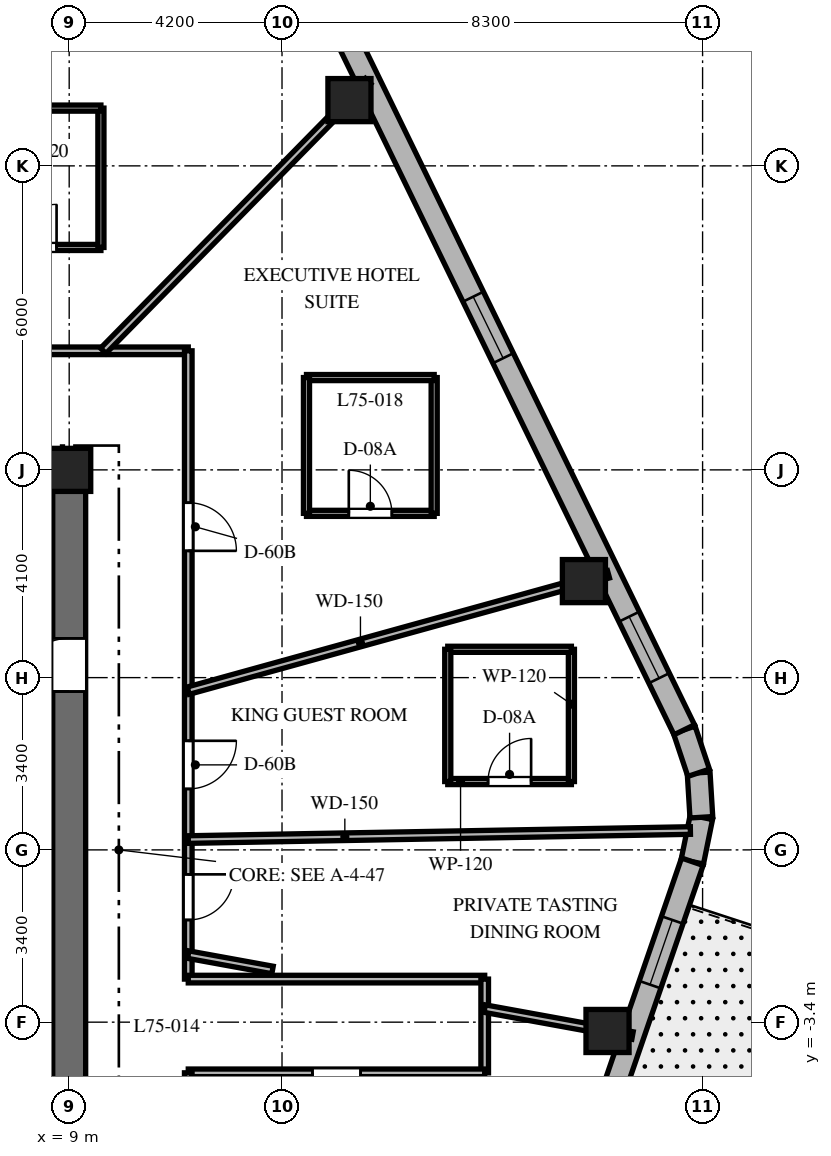
"""IFC4 building model, lengths in metres.
Left out: names, types, materials, properties, quantities, classifications, styles, units other than length and angle.
Written with IfcOpenShell. Run it as: python <this file> out.ifc"""

import sys

from ifc_helpers import new_model, si_unit, direction, frame, frame_2d, origin, origin_2d, place, context, subcontext, project, spatial, rectangle, extrude, element, fill, save


model = new_model("IFC4")
c1 = context("Model", 3, precision=1e-05, world=origin(), true_north=direction((0.0, 1.0)))
c2 = subcontext(c1, "Body", "Model", "MODEL_VIEW")
j1 = project(units=[si_unit("LENGTHUNIT", "METRE"), si_unit("PLANEANGLEUNIT", "RADIAN")], contexts=[c1])
p1 = place(None, origin())
s1 = spatial("IfcSite", under=j1, at=p1, CompositionType="ELEMENT")
p2 = place(p1, origin())
s2 = spatial("IfcBuilding", under=s1, at=p2, CompositionType="ELEMENT")
p3 = place(p2, frame((0.0, 0.0, 301.5)))
s3 = spatial("IfcBuildingStorey", under=s2, at=p3, CompositionType="ELEMENT", Elevation=301.5)
p4 = place(p3, frame((1.85, 7.5, 0.0), z_axis=(0.0, 0.0, 1.0), x_axis=(1.0, 0.0, 0.0)))
e1 = element("IfcWall", 1, at=p4, inside=s3, PredefinedType="SHEAR", context=c2, shape_type="SweptSolid", body=[
    extrude(rectangle(XDim=7.475, YDim=0.65, at=frame_2d((3.737, 0.0))), origin(), (0.0, 0.0, 1.0), 3.9),
])
p5 = place(p3, frame((9.0, -7.175, 0.0), z_axis=(0.0, 0.0, 1.0), x_axis=(0.0, 1.0, 0.0)))
e2 = element("IfcWall", 2, at=p5, inside=s3, PredefinedType="SHEAR", context=c2, shape_type="SweptSolid", body=[
    extrude(rectangle(XDim=14.35, YDim=0.65, at=frame_2d((7.175, 0.0))), origin(), (0.0, 0.0, 1.0), 3.9),
])
p6 = place(p5, frame((10.3, 0.0, 0.0)))
e3 = element("IfcOpeningElement", 3, at=p6, cuts=e2, PredefinedType="OPENING", context=c2, shape_type="SweptSolid", body=[
    extrude(rectangle(XDim=1.05, YDim=2.15, at=frame_2d((0.525, 1.075))), frame((0.0, 0.335, 0.0), z_axis=(0.0, -1.0, 0.0), x_axis=(1.0, 0.0, 0.0)), (0.0, 0.0, 1.0), 0.67),
])
for number, where, z_axis, x_axis in (
    (4, (9.0, 7.5, 0.0), (0.0, 0.0, 1.0), (1.0, 0.0, 0.0)),
    (5, (19.624, -3.574, 0.0), (0.0, 0.0, 1.0), (1.0, 0.0, 0.0)),
    (6, (19.158, 5.305, 0.0), (0.0, 0.0, 1.0), (1.0, 0.0, 0.0)),
    (7, (14.531, 14.798, 0.0), (0.0, 0.0, 1.0), (1.0, 0.0, 0.0)),
):
    element("IfcColumn", number, at=place(p3, frame(where, z_axis=z_axis, x_axis=x_axis)), inside=s3, PredefinedType="COLUMN", context=c2, shape_type="SweptSolid", body=[
        extrude(rectangle(XDim=0.85, YDim=0.85, at=origin_2d()), origin(), (0.0, 0.0, 1.0), 3.9),
    ])
p7 = place(p3, frame((21.298, -0.233, 0.0), z_axis=(0.0, 0.0, 1.0), x_axis=(0.199158176661, 0.979967356941, 0.0)))
e8 = element("IfcWall", 8, at=p7, inside=s3, PredefinedType="SOLIDWALL", context=c2, shape_type="SweptSolid", body=[
    extrude(rectangle(XDim=0.895, YDim=0.45, at=frame_2d((0.447, 0.0))), origin(), (0.0, 0.0, 1.0), 3.58),
])
p8 = place(p3, frame((21.476, 0.644, 0.0), z_axis=(0.0, 0.0, 1.0), x_axis=(-0.061031097918, 0.998135865044, 0.0)))
e9 = element("IfcWall", 9, at=p8, inside=s3, PredefinedType="SOLIDWALL", context=c2, shape_type="SweptSolid", body=[
    extrude(rectangle(XDim=0.88, YDim=0.45, at=frame_2d((0.44, 0.0))), origin(), (0.0, 0.0, 1.0), 3.58),
])
p9 = place(p3, frame((21.422, 1.522, 0.0), z_axis=(0.0, 0.0, 1.0), x_axis=(-0.316964162323, 0.94843751497, 0.0)))
e10 = element("IfcWall", 10, at=p9, inside=s3, PredefinedType="SOLIDWALL", context=c2, shape_type="SweptSolid", body=[
    extrude(rectangle(XDim=0.895, YDim=0.45, at=frame_2d((0.448, 0.0))), origin(), (0.0, 0.0, 1.0), 3.58),
])
p10 = place(p3, frame((15.26, -17.776, 0.0), z_axis=(0.0, 0.0, 1.0), x_axis=(0.325407437101, 0.945573899745, 0.0)))
e11 = element("IfcWall", 11, at=p10, inside=s3, PredefinedType="SOLIDWALL", context=c2, shape_type="SweptSolid", body=[
    extrude(rectangle(XDim=18.552, YDim=0.45, at=frame_2d((9.276, 0.0))), origin(), (0.0, 0.0, 1.0), 3.58),
])
p11 = place(p10, frame((4.602, 0.0, 0.0)))
e12 = element("IfcOpeningElement", 12, at=p11, cuts=e11, PredefinedType="OPENING", context=c2, shape_type="SweptSolid", body=[
    extrude(rectangle(XDim=0.95, YDim=2.15, at=frame_2d((0.475, 1.075))), frame((0.0, 0.235, 0.0), z_axis=(0.0, -1.0, 0.0), x_axis=(1.0, 0.0, 0.0)), (0.0, 0.0, 1.0), 0.47),
])
p12 = place(p10, frame((1.161, 0.0, 0.8)))
e13 = element("IfcOpeningElement", 13, at=p12, cuts=e11, PredefinedType="OPENING", context=c2, shape_type="SweptSolid", body=[
    extrude(rectangle(XDim=1.35, YDim=1.75, at=frame_2d((0.675, 0.875))), frame((0.0, 0.235, 0.0), z_axis=(0.0, -1.0, 0.0), x_axis=(1.0, 0.0, 0.0)), (0.0, 0.0, 1.0), 0.47),
])
p13 = place(p10, frame((8.548, 0.0, 0.8)))
e14 = element("IfcOpeningElement", 14, at=p13, cuts=e11, PredefinedType="OPENING", context=c2, shape_type="SweptSolid", body=[
    extrude(rectangle(XDim=1.35, YDim=1.75, at=frame_2d((0.675, 0.875))), frame((0.0, 0.235, 0.0), z_axis=(0.0, -1.0, 0.0), x_axis=(1.0, 0.0, 0.0)), (0.0, 0.0, 1.0), 0.47),
])
p14 = place(p10, frame((15.987, 0.0, 0.8)))
e15 = element("IfcOpeningElement", 15, at=p14, cuts=e11, PredefinedType="OPENING", context=c2, shape_type="SweptSolid", body=[
    extrude(rectangle(XDim=1.35, YDim=1.75, at=frame_2d((0.675, 0.875))), frame((0.0, 0.235, 0.0), z_axis=(0.0, -1.0, 0.0), x_axis=(1.0, 0.0, 0.0)), (0.0, 0.0, 1.0), 0.47),
])
p15 = place(p3, frame((21.138, 2.371, 0.0), z_axis=(0.0, 0.0, 1.0), x_axis=(-0.438128124058, 0.89891253574, 0.0)))
e16 = element("IfcWall", 16, at=p15, inside=s3, PredefinedType="SOLIDWALL", context=c2, shape_type="SweptSolid", body=[
    extrude(rectangle(XDim=17.565, YDim=0.45, at=frame_2d((8.782, 0.0))), origin(), (0.0, 0.0, 1.0), 3.58),
])
p16 = place(p15, frame((1.133, 0.0, 0.8)))
e17 = element("IfcOpeningElement", 17, at=p16, cuts=e16, PredefinedType="OPENING", context=c2, shape_type="SweptSolid", body=[
    extrude(rectangle(XDim=1.35, YDim=1.75, at=frame_2d((0.675, 0.875))), frame((0.0, 0.235, 0.0), z_axis=(0.0, -1.0, 0.0), x_axis=(1.0, 0.0, 0.0)), (0.0, 0.0, 1.0), 0.47),
])
p17 = place(p15, frame((8.158, 0.0, 0.8)))
e18 = element("IfcOpeningElement", 18, at=p17, cuts=e16, PredefinedType="OPENING", context=c2, shape_type="SweptSolid", body=[
    extrude(rectangle(XDim=1.35, YDim=1.75, at=frame_2d((0.675, 0.875))), frame((0.0, 0.235, 0.0), z_axis=(0.0, -1.0, 0.0), x_axis=(1.0, 0.0, 0.0)), (0.0, 0.0, 1.0), 0.47),
])
p18 = place(p15, frame((15.132, 0.0, 0.8)))
e19 = element("IfcOpeningElement", 19, at=p18, cuts=e16, PredefinedType="OPENING", context=c2, shape_type="SweptSolid", body=[
    extrude(rectangle(XDim=1.35, YDim=1.75, at=frame_2d((0.675, 0.875))), frame((0.0, 0.235, 0.0), z_axis=(0.0, -1.0, 0.0), x_axis=(1.0, 0.0, 0.0)), (0.0, 0.0, 1.0), 0.47),
])
p19 = place(p3, frame((0.92, 9.85, 0.0), z_axis=(0.0, 0.0, 1.0), x_axis=(1.0, 0.0, 0.0)))
e20 = element("IfcWall", 20, at=p19, inside=s3, PredefinedType="PARTITIONING", context=c2, shape_type="SweptSolid", body=[
    extrude(rectangle(XDim=10.43, YDim=0.15, at=frame_2d((5.215, 0.0))), origin(), (0.0, 0.0, 1.0), 2.17),
])
p20 = place(p19, frame((4.975, 0.0, 0.0)))
e21 = element("IfcOpeningElement", 21, at=p20, cuts=e20, PredefinedType="OPENING", context=c2, shape_type="SweptSolid", body=[
    extrude(rectangle(XDim=0.95, YDim=2.03, at=frame_2d((0.475, 1.015))), frame((0.0, 0.085, 0.0), z_axis=(0.0, -1.0, 0.0), x_axis=(1.0, 0.0, 0.0)), (0.0, 0.0, 1.0), 0.17),
])
p21 = place(p3, frame((11.35, 9.85, 0.0), z_axis=(0.0, 0.0, 1.0), x_axis=(0.0, -1.0, 0.0)))
e22 = element("IfcWall", 22, at=p21, inside=s3, PredefinedType="PARTITIONING", context=c2, shape_type="SweptSolid", body=[
    extrude(rectangle(XDim=12.4, YDim=0.15, at=frame_2d((6.2, 0.0))), origin(), (0.0, 0.0, 1.0), 2.17),
])
p22 = place(p21, frame((7.697, 0.0, 0.0)))
e23 = element("IfcOpeningElement", 23, at=p22, cuts=e22, PredefinedType="OPENING", context=c2, shape_type="SweptSolid", body=[
    extrude(rectangle(XDim=0.95, YDim=2.03, at=frame_2d((0.475, 1.015))), frame((0.0, 0.085, 0.0), z_axis=(0.0, -1.0, 0.0), x_axis=(1.0, 0.0, 0.0)), (0.0, 0.0, 1.0), 0.17),
])
p23 = place(p21, frame((2.998, 0.0, 0.0)))
e24 = element("IfcOpeningElement", 24, at=p23, cuts=e22, PredefinedType="OPENING", context=c2, shape_type="SweptSolid", body=[
    extrude(rectangle(XDim=0.95, YDim=2.03, at=frame_2d((0.475, 1.015))), frame((0.0, 0.085, 0.0), z_axis=(0.0, -1.0, 0.0), x_axis=(1.0, 0.0, 0.0)), (0.0, 0.0, 1.0), 0.17),
])
p24 = place(p21, frame((10.333, 0.0, 0.0)))
e25 = element("IfcOpeningElement", 25, at=p24, cuts=e22, PredefinedType="OPENING", context=c2, shape_type="SweptSolid", body=[
    extrude(rectangle(XDim=0.9, YDim=2.03, at=frame_2d((0.45, 1.015))), frame((0.0, 0.085, 0.0), z_axis=(0.0, -1.0, 0.0), x_axis=(1.0, 0.0, 0.0)), (0.0, 0.0, 1.0), 0.17),
])
p25 = place(p3, frame((11.35, -2.55, 0.0), z_axis=(0.0, 0.0, 1.0), x_axis=(1.0, 0.0, 0.0)))
e26 = element("IfcWall", 26, at=p25, inside=s3, PredefinedType="PARTITIONING", context=c2, shape_type="SweptSolid", body=[
    extrude(rectangle(XDim=5.85, YDim=0.15, at=frame_2d((2.925, 0.0))), origin(), (0.0, 0.0, 1.0), 2.17),
])
p26 = place(p3, frame((17.2, -2.55, 0.0), z_axis=(0.0, 0.0, 1.0), x_axis=(0.0, -1.0, 0.0)))
e27 = element("IfcWall", 27, at=p26, inside=s3, PredefinedType="PARTITIONING", context=c2, shape_type="SweptSolid", body=[
    extrude(rectangle(XDim=1.85, YDim=0.15, at=frame_2d((0.925, 0.0))), origin(), (0.0, 0.0, 1.0), 2.17),
])
p27 = place(p3, frame((17.2, -4.4, 0.0), z_axis=(0.0, 0.0, 1.0), x_axis=(-1.0, 0.0, 0.0)))
e28 = element("IfcWall", 28, at=p27, inside=s3, PredefinedType="PARTITIONING", context=c2, shape_type="SweptSolid", body=[
    extrude(rectangle(XDim=5.85, YDim=0.15, at=frame_2d((2.925, 0.0))), origin(), (0.0, 0.0, 1.0), 2.17),
])
p28 = place(p27, frame((2.45, 0.0, 0.0)))
e29 = element("IfcOpeningElement", 29, at=p28, cuts=e28, PredefinedType="OPENING", context=c2, shape_type="SweptSolid", body=[
    extrude(rectangle(XDim=0.95, YDim=2.03, at=frame_2d((0.475, 1.015))), frame((0.0, 0.085, 0.0), z_axis=(0.0, -1.0, 0.0), x_axis=(1.0, 0.0, 0.0)), (0.0, 0.0, 1.0), 0.17),
])
p29 = place(p3, frame((11.35, -4.4, 0.0), z_axis=(0.0, 0.0, 1.0), x_axis=(0.0, -1.0, 0.0)))
e30 = element("IfcWall", 30, at=p29, inside=s3, PredefinedType="PARTITIONING", context=c2, shape_type="SweptSolid", body=[
    extrude(rectangle(XDim=5.45, YDim=0.15, at=frame_2d((2.725, 0.0))), origin(), (0.0, 0.0, 1.0), 2.17),
])
p30 = place(p3, frame((11.35, 0.204, 0.0), z_axis=(0.0, 0.0, 1.0), x_axis=(0.999838748671, 0.017957635019, 0.0)))
e31 = element("IfcWall", 31, at=p30, inside=s3, PredefinedType="PARTITIONING", context=c2, shape_type="SweptSolid", body=[
    extrude(rectangle(XDim=9.911, YDim=0.15, at=frame_2d((4.956, 0.0))), origin(), (0.0, 0.0, 1.0), 2.17),
])
p31 = place(p3, frame((11.35, 3.143, 0.0), z_axis=(0.0, 0.0, 1.0), x_axis=(0.963731818141, 0.266872596386, 0.0)))
e32 = element("IfcWall", 32, at=p31, inside=s3, PredefinedType="PARTITIONING", context=c2, shape_type="SweptSolid", body=[
    extrude(rectangle(XDim=8.605, YDim=0.15, at=frame_2d((4.302, 0.0))), origin(), (0.0, 0.0, 1.0), 2.17),
])
p32 = place(p3, frame((9.672, 9.85, 0.0), z_axis=(0.0, 0.0, 1.0), x_axis=(0.700629771301, 0.713524998558, 0.0)))
e33 = element("IfcWall", 33, at=p32, inside=s3, PredefinedType="PARTITIONING", context=c2, shape_type="SweptSolid", body=[
    extrude(rectangle(XDim=7.459, YDim=0.15, at=frame_2d((3.73, 0.0))), origin(), (0.0, 0.0, 1.0), 2.17),
])
p33 = place(p3, frame((11.35, -2.067, 0.0), z_axis=(0.0, 0.0, 1.0), x_axis=(0.983807459651, -0.179228575665, 0.0)))
e34 = element("IfcWall", 34, at=p33, inside=s3, PredefinedType="PARTITIONING", context=c2, shape_type="SweptSolid", body=[
    extrude(rectangle(XDim=1.69, YDim=0.15, at=frame_2d((0.845, 0.0))), origin(), (0.0, 0.0, 1.0), 3.58),
])
p34 = place(p3, frame((17.2, -3.133, 0.0), z_axis=(0.0, 0.0, 1.0), x_axis=(0.983817168797, -0.179175272791, 0.0)))
e35 = element("IfcWall", 35, at=p34, inside=s3, PredefinedType="PARTITIONING", context=c2, shape_type="SweptSolid", body=[
    extrude(rectangle(XDim=2.965, YDim=0.15, at=frame_2d((1.482, 0.0))), origin(), (0.0, 0.0, 1.0), 2.17),
])
p35 = place(p3, frame((16.471, 1.349, 0.0), z_axis=(0.0, 0.0, 1.0), x_axis=(1.0, 0.0, 0.0)))
e36 = element("IfcWall", 36, at=p35, inside=s3, PredefinedType="PARTITIONING", context=c2, shape_type="SweptSolid", body=[
    extrude(rectangle(XDim=2.44, YDim=0.12, at=frame_2d((1.22, 0.0))), origin(), (0.0, 0.0, 1.0), 3.58),
])
p36 = place(p35, frame((0.795, 0.0, 0.0)))
e37 = element("IfcOpeningElement", 37, at=p36, cuts=e36, PredefinedType="OPENING", context=c2, shape_type="SweptSolid", body=[
    extrude(rectangle(XDim=0.85, YDim=2.03, at=frame_2d((0.425, 1.015))), frame((0.0, 0.07, 0.0), z_axis=(0.0, -1.0, 0.0), x_axis=(1.0, 0.0, 0.0)), (0.0, 0.0, 1.0), 0.14),
])
p37 = place(p3, frame((18.911, 1.349, 0.0), z_axis=(0.0, 0.0, 1.0), x_axis=(0.0, 1.0, 0.0)))
e38 = element("IfcWall", 38, at=p37, inside=s3, PredefinedType="PARTITIONING", context=c2, shape_type="SweptSolid", body=[
    extrude(rectangle(XDim=2.61, YDim=0.12, at=frame_2d((1.305, 0.0))), origin(), (0.0, 0.0, 1.0), 2.17),
])
p38 = place(p3, frame((18.911, 3.959, 0.0), z_axis=(0.0, 0.0, 1.0), x_axis=(-1.0, 0.0, 0.0)))
e39 = element("IfcWall", 39, at=p38, inside=s3, PredefinedType="PARTITIONING", context=c2, shape_type="SweptSolid", body=[
    extrude(rectangle(XDim=2.44, YDim=0.12, at=frame_2d((1.22, 0.0))), origin(), (0.0, 0.0, 1.0), 2.17),
])
p39 = place(p3, frame((16.471, 3.959, 0.0), z_axis=(0.0, 0.0, 1.0), x_axis=(0.0, -1.0, 0.0)))
e40 = element("IfcWall", 40, at=p39, inside=s3, PredefinedType="PARTITIONING", context=c2, shape_type="SweptSolid", body=[
    extrude(rectangle(XDim=2.61, YDim=0.12, at=frame_2d((1.305, 0.0))), origin(), (0.0, 0.0, 1.0), 3.58),
])
p40 = place(p3, frame((13.683, 6.642, 0.0), z_axis=(0.0, 0.0, 1.0), x_axis=(1.0, 0.0, 0.0)))
e41 = element("IfcWall", 41, at=p40, inside=s3, PredefinedType="PARTITIONING", context=c2, shape_type="SweptSolid", body=[
    extrude(rectangle(XDim=2.52, YDim=0.12, at=frame_2d((1.26, 0.0))), origin(), (0.0, 0.0, 1.0), 3.07),
])
p41 = place(p40, frame((0.835, 0.0, 0.0)))
e42 = element("IfcOpeningElement", 42, at=p41, cuts=e41, PredefinedType="OPENING", context=c2, shape_type="SweptSolid", body=[
    extrude(rectangle(XDim=0.85, YDim=2.03, at=frame_2d((0.425, 1.015))), frame((0.0, 0.07, 0.0), z_axis=(0.0, -1.0, 0.0), x_axis=(1.0, 0.0, 0.0)), (0.0, 0.0, 1.0), 0.14),
])
p42 = place(p3, frame((16.203, 6.642, 0.0), z_axis=(0.0, 0.0, 1.0), x_axis=(0.0, 1.0, 0.0)))
e43 = element("IfcWall", 43, at=p42, inside=s3, PredefinedType="PARTITIONING", context=c2, shape_type="SweptSolid", body=[
    extrude(rectangle(XDim=2.68, YDim=0.12, at=frame_2d((1.34, 0.0))), origin(), (0.0, 0.0, 1.0), 3.58),
])
p43 = place(p3, frame((16.203, 9.322, 0.0), z_axis=(0.0, 0.0, 1.0), x_axis=(-1.0, 0.0, 0.0)))
e44 = element("IfcWall", 44, at=p43, inside=s3, PredefinedType="PARTITIONING", context=c2, shape_type="SweptSolid", body=[
    extrude(rectangle(XDim=2.52, YDim=0.12, at=frame_2d((1.26, 0.0))), origin(), (0.0, 0.0, 1.0), 3.106),
])
p44 = place(p3, frame((13.683, 9.322, 0.0), z_axis=(0.0, 0.0, 1.0), x_axis=(0.0, -1.0, 0.0)))
e45 = element("IfcWall", 45, at=p44, inside=s3, PredefinedType="PARTITIONING", context=c2, shape_type="SweptSolid", body=[
    extrude(rectangle(XDim=2.68, YDim=0.12, at=frame_2d((1.34, 0.0))), origin(), (0.0, 0.0, 1.0), 3.58),
])
p45 = place(p3, frame((7.026, 11.89, 0.0), z_axis=(0.0, 0.0, 1.0), x_axis=(1.0, 0.0, 0.0)))
e46 = element("IfcWall", 46, at=p45, inside=s3, PredefinedType="PARTITIONING", context=c2, shape_type="SweptSolid", body=[
    extrude(rectangle(XDim=2.6, YDim=0.12, at=frame_2d((1.3, 0.0))), origin(), (0.0, 0.0, 1.0), 3.021),
])
p46 = place(p45, frame((0.875, 0.0, 0.0)))
e47 = element("IfcOpeningElement", 47, at=p46, cuts=e46, PredefinedType="OPENING", context=c2, shape_type="SweptSolid", body=[
    extrude(rectangle(XDim=0.85, YDim=2.03, at=frame_2d((0.425, 1.015))), frame((0.0, 0.07, 0.0), z_axis=(0.0, -1.0, 0.0), x_axis=(1.0, 0.0, 0.0)), (0.0, 0.0, 1.0), 0.14),
])
p47 = place(p3, frame((9.626, 11.89, 0.0), z_axis=(0.0, 0.0, 1.0), x_axis=(0.0, 1.0, 0.0)))
e48 = element("IfcWall", 48, at=p47, inside=s3, PredefinedType="PARTITIONING", context=c2, shape_type="SweptSolid", body=[
    extrude(rectangle(XDim=2.75, YDim=0.12, at=frame_2d((1.375, 0.0))), origin(), (0.0, 0.0, 1.0), 3.152),
])
p48 = place(p3, frame((9.626, 14.64, 0.0), z_axis=(0.0, 0.0, 1.0), x_axis=(-1.0, 0.0, 0.0)))
e49 = element("IfcWall", 49, at=p48, inside=s3, PredefinedType="PARTITIONING", context=c2, shape_type="SweptSolid", body=[
    extrude(rectangle(XDim=2.6, YDim=0.12, at=frame_2d((1.3, 0.0))), origin(), (0.0, 0.0, 1.0), 3.152),
])
p49 = place(p14, origin())
e50 = element("IfcWindow", 50, at=p49, inside=s3, PartitioningType="SINGLE_PANEL", PredefinedType="WINDOW", context=c2, shape_type="SweptSolid", body=[
    extrude(rectangle(XDim=1.35, YDim=1.75, at=frame_2d((0.675, 0.875))), frame((0.0, 0.03, 0.0), z_axis=(0.0, -1.0, 0.0), x_axis=(1.0, 0.0, 0.0)), (0.0, 0.0, 1.0), 0.06),
])
fill(e15, e50)
p50 = place(p16, origin())
e51 = element("IfcWindow", 51, at=p50, inside=s3, PartitioningType="SINGLE_PANEL", PredefinedType="WINDOW", context=c2, shape_type="SweptSolid", body=[
    extrude(rectangle(XDim=1.35, YDim=1.75, at=frame_2d((0.675, 0.875))), frame((0.0, 0.03, 0.0), z_axis=(0.0, -1.0, 0.0), x_axis=(1.0, 0.0, 0.0)), (0.0, 0.0, 1.0), 0.06),
])
fill(e17, e51)
p51 = place(p17, origin())
e52 = element("IfcWindow", 52, at=p51, inside=s3, PartitioningType="SINGLE_PANEL", PredefinedType="WINDOW", context=c2, shape_type="SweptSolid", body=[
    extrude(rectangle(XDim=1.35, YDim=1.75, at=frame_2d((0.675, 0.875))), frame((0.0, 0.03, 0.0), z_axis=(0.0, -1.0, 0.0), x_axis=(1.0, 0.0, 0.0)), (0.0, 0.0, 1.0), 0.06),
])
fill(e18, e52)
p52 = place(p6, origin())
e53 = element("IfcDoor", 53, at=p52, inside=s3, OperationType="SINGLE_SWING_LEFT", PredefinedType="DOOR", context=c2, shape_type="SweptSolid", body=[
    extrude(rectangle(XDim=1.05, YDim=2.15, at=frame_2d((0.525, 1.075))), frame((0.0, 0.025, 0.0), z_axis=(0.0, -1.0, 0.0), x_axis=(1.0, 0.0, 0.0)), (0.0, 0.0, 1.0), 0.05),
])
fill(e3, e53)
p53 = place(p22, origin())
e54 = element("IfcDoor", 54, at=p53, inside=s3, OperationType="SINGLE_SWING_LEFT", PredefinedType="DOOR", context=c2, shape_type="SweptSolid", body=[
    extrude(rectangle(XDim=0.95, YDim=2.03, at=frame_2d((0.475, 1.015))), frame((0.0, 0.025, 0.0), z_axis=(0.0, -1.0, 0.0), x_axis=(1.0, 0.0, 0.0)), (0.0, 0.0, 1.0), 0.05),
])
fill(e23, e54)
p54 = place(p36, origin())
e55 = element("IfcDoor", 55, at=p54, inside=s3, OperationType="SINGLE_SWING_RIGHT", PredefinedType="DOOR", context=c2, shape_type="SweptSolid", body=[
    extrude(rectangle(XDim=0.85, YDim=2.03, at=frame_2d((0.425, 1.015))), frame((0.0, 0.025, 0.0), z_axis=(0.0, -1.0, 0.0), x_axis=(1.0, 0.0, 0.0)), (0.0, 0.0, 1.0), 0.05),
])
fill(e37, e55)
p55 = place(p23, origin())
e56 = element("IfcDoor", 56, at=p55, inside=s3, OperationType="SINGLE_SWING_RIGHT", PredefinedType="DOOR", context=c2, shape_type="SweptSolid", body=[
    extrude(rectangle(XDim=0.95, YDim=2.03, at=frame_2d((0.475, 1.015))), frame((0.0, 0.025, 0.0), z_axis=(0.0, -1.0, 0.0), x_axis=(1.0, 0.0, 0.0)), (0.0, 0.0, 1.0), 0.05),
])
fill(e24, e56)
p56 = place(p41, origin())
e57 = element("IfcDoor", 57, at=p56, inside=s3, OperationType="SINGLE_SWING_LEFT", PredefinedType="DOOR", context=c2, shape_type="SweptSolid", body=[
    extrude(rectangle(XDim=0.85, YDim=2.03, at=frame_2d((0.425, 1.015))), frame((0.0, 0.025, 0.0), z_axis=(0.0, -1.0, 0.0), x_axis=(1.0, 0.0, 0.0)), (0.0, 0.0, 1.0), 0.05),
])
fill(e42, e57)
p57 = place(p46, origin())
e58 = element("IfcDoor", 58, at=p57, inside=s3, OperationType="SINGLE_SWING_RIGHT", PredefinedType="DOOR", context=c2, shape_type="SweptSolid", body=[
    extrude(rectangle(XDim=0.85, YDim=2.03, at=frame_2d((0.425, 1.015))), frame((0.0, 0.025, 0.0), z_axis=(0.0, -1.0, 0.0), x_axis=(1.0, 0.0, 0.0)), (0.0, 0.0, 1.0), 0.05),
])
fill(e47, e58)
p58 = place(p28, origin())
e59 = element("IfcDoor", 59, at=p58, inside=s3, OperationType="SINGLE_SWING_RIGHT", PredefinedType="DOOR", context=c2, shape_type="SweptSolid", body=[
    extrude(rectangle(XDim=0.95, YDim=2.03, at=frame_2d((0.475, 1.015))), frame((0.0, 0.025, 0.0), z_axis=(0.0, -1.0, 0.0), x_axis=(1.0, 0.0, 0.0)), (0.0, 0.0, 1.0), 0.05),
])
fill(e29, e59)
p59 = place(p24, origin())
e60 = element("IfcDoor", 60, at=p59, inside=s3, OperationType="SINGLE_SWING_LEFT", PredefinedType="DOOR", context=c2, shape_type="SweptSolid", body=[
    extrude(rectangle(XDim=0.9, YDim=2.03, at=frame_2d((0.45, 1.015))), frame((0.0, 0.025, 0.0), z_axis=(0.0, -1.0, 0.0), x_axis=(1.0, 0.0, 0.0)), (0.0, 0.0, 1.0), 0.05),
])
fill(e25, e60)
save(model, sys.argv[1])
